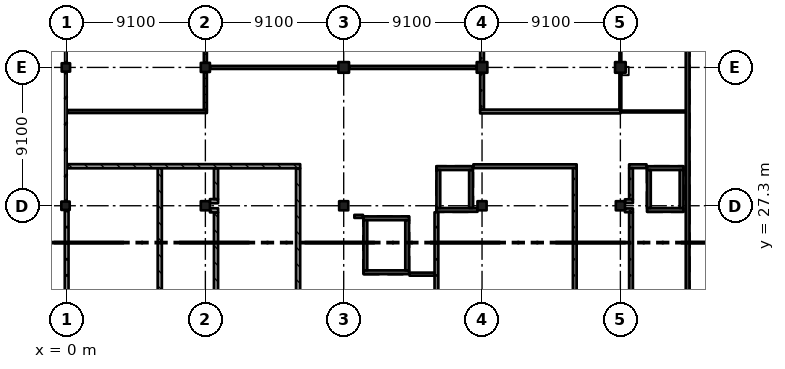
"""IFC4 building model, lengths in metres.
Left out: names, types, materials, properties, quantities, classifications, styles, units other than length and angle.
Written with IfcOpenShell. Run it as: python <this file> out.ifc"""

import sys

from ifc_helpers import new_model, si_unit, direction, frame, frame_2d, origin, origin_2d, place, context, subcontext, project, spatial, rectangle, extrude, element, fill, save


model = new_model("IFC4")
c1 = context("Model", 3, precision=1e-05, world=origin(), true_north=direction((0.0, 1.0)))
c2 = subcontext(c1, "Body", "Model", "MODEL_VIEW")
j1 = project(units=[si_unit("LENGTHUNIT", "METRE"), si_unit("PLANEANGLEUNIT", "RADIAN")], contexts=[c1])
p1 = place(None, origin())
s1 = spatial("IfcSite", under=j1, at=p1, CompositionType="ELEMENT")
p2 = place(p1, origin())
s2 = spatial("IfcBuilding", under=s1, at=p2, CompositionType="ELEMENT")
p3 = place(p2, frame((0.0, 0.0, 20.02)))
s3 = spatial("IfcBuildingStorey", under=s2, at=p3, CompositionType="ELEMENT", Elevation=20.02)
for number, where, z_axis, x_axis in (
    (1, (-0.1, 27.3, 0.0), (0.0, 0.0, 1.0), (1.0, 0.0, 0.0)),
    (2, (-0.075, 36.4, 0.0), (0.0, 0.0, 1.0), (1.0, 0.0, 0.0)),
):
    element("IfcColumn", number, at=place(p3, frame(where, z_axis=z_axis, x_axis=x_axis)), inside=s3, PredefinedType="COLUMN", context=c2, shape_type="SweptSolid", body=[
        extrude(rectangle(XDim=0.55, YDim=0.55, at=origin_2d()), origin(), (0.0, 0.0, 1.0), 4.55),
    ])
for number, where, z_axis, x_axis in (
    (3, (9.1, 27.3, 0.0), (0.0, 0.0, 1.0), (1.0, 0.0, 0.0)),
    (4, (9.1, 36.4, 0.0), (0.0, 0.0, 1.0), (1.0, 0.0, 0.0)),
    (5, (18.2, 27.3, 0.0), (0.0, 0.0, 1.0), (1.0, 0.0, 0.0)),
):
    element("IfcColumn", number, at=place(p3, frame(where, z_axis=z_axis, x_axis=x_axis)), inside=s3, PredefinedType="COLUMN", context=c2, shape_type="SweptSolid", body=[
        extrude(rectangle(XDim=0.6, YDim=0.6, at=origin_2d()), origin(), (0.0, 0.0, 1.0), 4.55),
    ])
p4 = place(p3, frame((18.2, 36.4, 0.0), z_axis=(0.0, 0.0, 1.0), x_axis=(1.0, 0.0, 0.0)))
e6 = element("IfcColumn", 6, at=p4, inside=s3, PredefinedType="COLUMN", context=c2, shape_type="SweptSolid", body=[
    extrude(rectangle(XDim=0.7, YDim=0.7, at=origin_2d()), origin(), (0.0, 0.0, 1.0), 4.55),
])
p5 = place(p3, frame((27.3, 27.3, 0.0), z_axis=(0.0, 0.0, 1.0), x_axis=(1.0, 0.0, 0.0)))
e7 = element("IfcColumn", 7, at=p5, inside=s3, PredefinedType="COLUMN", context=c2, shape_type="SweptSolid", body=[
    extrude(rectangle(XDim=0.6, YDim=0.6, at=origin_2d()), origin(), (0.0, 0.0, 1.0), 4.55),
])
p6 = place(p3, frame((27.3, 36.4, 0.0), z_axis=(0.0, 0.0, 1.0), x_axis=(1.0, 0.0, 0.0)))
e8 = element("IfcColumn", 8, at=p6, inside=s3, PredefinedType="COLUMN", context=c2, shape_type="SweptSolid", body=[
    extrude(rectangle(XDim=0.7, YDim=0.7, at=origin_2d()), origin(), (0.0, 0.0, 1.0), 4.55),
])
p7 = place(p3, frame((36.4, 27.3, 0.0), z_axis=(0.0, 0.0, 1.0), x_axis=(1.0, 0.0, 0.0)))
e9 = element("IfcColumn", 9, at=p7, inside=s3, PredefinedType="COLUMN", context=c2, shape_type="SweptSolid", body=[
    extrude(rectangle(XDim=0.6, YDim=0.6, at=origin_2d()), origin(), (0.0, 0.0, 1.0), 4.55),
])
p8 = place(p3, frame((36.4, 36.4, 0.0), z_axis=(0.0, 0.0, 1.0), x_axis=(1.0, 0.0, 0.0)))
e10 = element("IfcColumn", 10, at=p8, inside=s3, PredefinedType="COLUMN", context=c2, shape_type="SweptSolid", body=[
    extrude(rectangle(XDim=0.7, YDim=0.7, at=origin_2d()), origin(), (0.0, 0.0, 1.0), 4.55),
])
p9 = place(p3, frame((40.825, 40.95, 0.0), z_axis=(0.0, 0.0, 1.0), x_axis=(0.0, -1.0, 0.0)))
e11 = element("IfcWall", 11, at=p9, inside=s3, PredefinedType="SHEAR", context=c2, shape_type="SweptSolid", body=[
    extrude(rectangle(XDim=31.85, YDim=0.25, at=frame_2d((15.925, 0.0))), origin(), (0.0, 0.0, 1.0), 4.55),
])
p10 = place(p3, frame((40.55, 27.025, 0.0), z_axis=(0.0, 0.0, 1.0), x_axis=(-1.0, 0.0, 0.0)))
e12 = element("IfcWall", 12, at=p10, inside=s3, PredefinedType="SHEAR", context=c2, shape_type="SweptSolid", body=[
    extrude(rectangle(XDim=2.4, YDim=0.25, at=frame_2d((1.2, 0.0))), origin(), (0.0, 0.0, 1.0), 4.55),
])
p11 = place(p10, frame((0.75, 0.0, 0.0)))
e13 = element("IfcOpeningElement", 13, at=p11, cuts=e12, PredefinedType="OPENING", context=c2, shape_type="SweptSolid", body=[
    extrude(rectangle(XDim=0.9, YDim=2.1, at=frame_2d((0.45, 1.05))), frame((0.0, 0.135, 0.0), z_axis=(0.0, -1.0, 0.0), x_axis=(1.0, 0.0, 0.0)), (0.0, 0.0, 1.0), 0.27),
])
p12 = place(p3, frame((40.55, 29.775, 0.0), z_axis=(0.0, 0.0, 1.0), x_axis=(-1.0, 0.0, 0.0)))
e14 = element("IfcWall", 14, at=p12, inside=s3, PredefinedType="SHEAR", context=c2, shape_type="SweptSolid", body=[
    extrude(rectangle(XDim=2.4, YDim=0.25, at=frame_2d((1.2, 0.0))), origin(), (0.0, 0.0, 1.0), 4.55),
])
for number, where, z_axis, x_axis in (
    (15, (38.275, 29.65, 0.0), (0.0, 0.0, 1.0), (0.0, -1.0, 0.0)),
    (16, (40.425, 29.65, 0.0), (0.0, 0.0, 1.0), (0.0, -1.0, 0.0)),
):
    element("IfcWall", number, at=place(p3, frame(where, z_axis=z_axis, x_axis=x_axis)), inside=s3, PredefinedType="SHEAR", context=c2, shape_type="SweptSolid", body=[
        extrude(rectangle(XDim=2.5, YDim=0.25, at=frame_2d((1.25, 0.0))), origin(), (0.0, 0.0, 1.0), 4.55),
    ])
p13 = place(p3, frame((27.0, 27.025, 0.0), z_axis=(0.0, 0.0, 1.0), x_axis=(-1.0, 0.0, 0.0)))
e17 = element("IfcWall", 17, at=p13, inside=s3, PredefinedType="SHEAR", context=c2, shape_type="SweptSolid", body=[
    extrude(rectangle(XDim=2.7, YDim=0.25, at=frame_2d((1.35, 0.0))), origin(), (0.0, 0.0, 1.0), 4.55),
])
p14 = place(p3, frame((26.7, 29.775, 0.0), z_axis=(0.0, 0.0, 1.0), x_axis=(-1.0, 0.0, 0.0)))
e18 = element("IfcWall", 18, at=p14, inside=s3, PredefinedType="SHEAR", context=c2, shape_type="SweptSolid", body=[
    extrude(rectangle(XDim=2.4, YDim=0.25, at=frame_2d((1.2, 0.0))), origin(), (0.0, 0.0, 1.0), 4.55),
])
p15 = place(p3, frame((24.425, 29.65, 0.0), z_axis=(0.0, 0.0, 1.0), x_axis=(0.0, -1.0, 0.0)))
e19 = element("IfcWall", 19, at=p15, inside=s3, PredefinedType="SHEAR", context=c2, shape_type="SweptSolid", body=[
    extrude(rectangle(XDim=2.5, YDim=0.25, at=frame_2d((1.25, 0.0))), origin(), (0.0, 0.0, 1.0), 4.55),
])
p16 = place(p15, frame((0.9, 0.0, 0.0)))
e20 = element("IfcOpeningElement", 20, at=p16, cuts=e19, PredefinedType="OPENING", context=c2, shape_type="SweptSolid", body=[
    extrude(rectangle(XDim=0.7, YDim=2.1, at=frame_2d((0.35, 1.05))), frame((0.0, 0.135, 0.0), z_axis=(0.0, -1.0, 0.0), x_axis=(1.0, 0.0, 0.0)), (0.0, 0.0, 1.0), 0.27),
])
p17 = place(p3, frame((26.575, 29.65, 0.0), z_axis=(0.0, 0.0, 1.0), x_axis=(0.0, -1.0, 0.0)))
e21 = element("IfcWall", 21, at=p17, inside=s3, PredefinedType="SHEAR", context=c2, shape_type="SweptSolid", body=[
    extrude(rectangle(XDim=2.5, YDim=0.25, at=frame_2d((1.25, 0.0))), origin(), (0.0, 0.0, 1.0), 4.55),
])
p18 = place(p3, frame((22.5, 22.925, 0.0), z_axis=(0.0, 0.0, 1.0), x_axis=(-1.0, 0.0, 0.0)))
e22 = element("IfcWall", 22, at=p18, inside=s3, PredefinedType="SHEAR", context=c2, shape_type="SweptSolid", body=[
    extrude(rectangle(XDim=3.0, YDim=0.25, at=frame_2d((1.5, 0.0))), origin(), (0.0, 0.0, 1.0), 4.55),
])
p19 = place(p18, frame((0.95, 0.0, 0.0)))
e23 = element("IfcOpeningElement", 23, at=p19, cuts=e22, PredefinedType="OPENING", context=c2, shape_type="SweptSolid", body=[
    extrude(rectangle(XDim=1.1, YDim=2.1, at=frame_2d((0.55, 1.05))), frame((0.0, 0.135, 0.0), z_axis=(0.0, -1.0, 0.0), x_axis=(1.0, 0.0, 0.0)), (0.0, 0.0, 1.0), 0.27),
])
p20 = place(p3, frame((22.5, 26.475, 0.0), z_axis=(0.0, 0.0, 1.0), x_axis=(-1.0, 0.0, 0.0)))
e24 = element("IfcWall", 24, at=p20, inside=s3, PredefinedType="SHEAR", context=c2, shape_type="SweptSolid", body=[
    extrude(rectangle(XDim=3.0, YDim=0.25, at=frame_2d((1.5, 0.0))), origin(), (0.0, 0.0, 1.0), 4.55),
])
for number, where, z_axis, x_axis in (
    (25, (19.625, 26.35, 0.0), (0.0, 0.0, 1.0), (0.0, -1.0, 0.0)),
    (26, (22.375, 26.35, 0.0), (0.0, 0.0, 1.0), (0.0, -1.0, 0.0)),
):
    element("IfcWall", number, at=place(p3, frame(where, z_axis=z_axis, x_axis=x_axis)), inside=s3, PredefinedType="SHEAR", context=c2, shape_type="SweptSolid", body=[
        extrude(rectangle(XDim=3.3, YDim=0.25, at=frame_2d((1.65, 0.0))), origin(), (0.0, 0.0, 1.0), 4.55),
    ])
p21 = place(p3, frame((-0.025, 27.025, 0.0), z_axis=(0.0, 0.0, 1.0), x_axis=(0.0, -1.0, 0.0)))
e27 = element("IfcWall", 27, at=p21, inside=s3, PredefinedType="SOLIDWALL", context=c2, shape_type="SweptSolid", body=[
    extrude(rectangle(XDim=8.55, YDim=0.25, at=frame_2d((4.275, 0.0))), origin(), (0.0, 0.0, 1.0), 3.5),
])
p22 = place(p3, frame((0.03, 29.9, 0.0), z_axis=(0.0, 0.0, 1.0), x_axis=(1.0, 0.0, 0.0)))
e28 = element("IfcWall", 28, at=p22, inside=s3, PredefinedType="SOLIDWALL", context=c2, shape_type="SweptSolid", body=[
    extrude(rectangle(XDim=15.307, YDim=0.275, at=frame_2d((7.654, 0.0))), origin(), (0.0, 0.0, 1.0), 4.25),
])
p23 = place(p3, frame((0.03, 33.5, 0.0), z_axis=(0.0, 0.0, 1.0), x_axis=(1.0, 0.0, 0.0)))
e29 = element("IfcWall", 29, at=p23, inside=s3, PredefinedType="PARTITIONING", context=c2, shape_type="SweptSolid", body=[
    extrude(rectangle(XDim=9.17, YDim=0.2, at=frame_2d((4.585, 0.0))), origin(), (0.0, 0.0, 1.0), 4.25),
])
p24 = place(p23, frame((1.05, 0.0, 0.0)))
e30 = element("IfcOpeningElement", 30, at=p24, cuts=e29, PredefinedType="OPENING", context=c2, shape_type="SweptSolid", body=[
    extrude(rectangle(XDim=2.4, YDim=2.4, at=frame_2d((1.2, 1.2))), frame((0.0, 0.11, 0.0), z_axis=(0.0, -1.0, 0.0), x_axis=(1.0, 0.0, 0.0)), (0.0, 0.0, 1.0), 0.22),
])
p25 = place(p23, frame((5.65, 0.0, 0.0)))
e31 = element("IfcOpeningElement", 31, at=p25, cuts=e29, PredefinedType="OPENING", context=c2, shape_type="SweptSolid", body=[
    extrude(rectangle(XDim=2.4, YDim=2.4, at=frame_2d((1.2, 1.2))), frame((0.0, 0.11, 0.0), z_axis=(0.0, -1.0, 0.0), x_axis=(1.0, 0.0, 0.0)), (0.0, 0.0, 1.0), 0.22),
])
p26 = place(p3, frame((6.1, 29.762, 0.0), z_axis=(0.0, 0.0, 1.0), x_axis=(0.0, -1.0, 0.0)))
e32 = element("IfcWall", 32, at=p26, inside=s3, PredefinedType="SOLIDWALL", context=c2, shape_type="SweptSolid", body=[
    extrude(rectangle(XDim=9.825, YDim=0.275, at=frame_2d((4.913, 0.0))), origin(), (0.0, 0.0, 1.0), 4.25),
])
p27 = place(p3, frame((9.1, 33.6, 0.0), z_axis=(0.0, 0.0, 1.0), x_axis=(0.0, 1.0, 0.0)))
e33 = element("IfcWall", 33, at=p27, inside=s3, PredefinedType="PARTITIONING", context=c2, shape_type="SweptSolid", body=[
    extrude(rectangle(XDim=2.5, YDim=0.2, at=frame_2d((1.25, 0.0))), origin(), (0.0, 0.0, 1.0), 3.5),
])
p28 = place(p3, frame((9.1, 36.7, 0.0), z_axis=(0.0, 0.0, 1.0), x_axis=(0.0, 1.0, 0.0)))
e34 = element("IfcWall", 34, at=p28, inside=s3, PredefinedType="PARTITIONING", context=c2, shape_type="SweptSolid", body=[
    extrude(rectangle(XDim=4.0, YDim=0.2, at=frame_2d((2.0, 0.0))), origin(), (0.0, 0.0, 1.0), 3.25),
])
p29 = place(p3, frame((9.4, 27.6, 0.0), z_axis=(0.0, 0.0, 1.0), x_axis=(1.0, 0.0, 0.0)))
e35 = element("IfcWall", 35, at=p29, inside=s3, PredefinedType="SOLIDWALL", context=c2, shape_type="SweptSolid", body=[
    extrude(rectangle(XDim=0.538, YDim=0.275, at=frame_2d((0.269, 0.0))), origin(), (0.0, 0.0, 1.0), 4.25),
])
p30 = place(p3, frame((9.8, 19.938, 0.0), z_axis=(0.0, 0.0, 1.0), x_axis=(0.0, 1.0, 0.0)))
e36 = element("IfcWall", 36, at=p30, inside=s3, PredefinedType="SOLIDWALL", context=c2, shape_type="SweptSolid", body=[
    extrude(rectangle(XDim=6.925, YDim=0.275, at=frame_2d((3.462, 0.0))), origin(), (0.0, 0.0, 1.0), 4.25),
])
p31 = place(p3, frame((9.8, 27.738, 0.0), z_axis=(0.0, 0.0, 1.0), x_axis=(0.0, 1.0, 0.0)))
e37 = element("IfcWall", 37, at=p31, inside=s3, PredefinedType="SOLIDWALL", context=c2, shape_type="SweptSolid", body=[
    extrude(rectangle(XDim=2.025, YDim=0.275, at=frame_2d((1.012, 0.0))), origin(), (0.0, 0.0, 1.0), 4.25),
])
p32 = place(p3, frame((9.938, 27.0, 0.0), z_axis=(0.0, 0.0, 1.0), x_axis=(-1.0, 0.0, 0.0)))
e38 = element("IfcWall", 38, at=p32, inside=s3, PredefinedType="SOLIDWALL", context=c2, shape_type="SweptSolid", body=[
    extrude(rectangle(XDim=0.538, YDim=0.275, at=frame_2d((0.269, 0.0))), origin(), (0.0, 0.0, 1.0), 4.25),
])
p33 = place(p3, frame((15.2, 29.762, 0.0), z_axis=(0.0, 0.0, 1.0), x_axis=(0.0, -1.0, 0.0)))
e39 = element("IfcWall", 39, at=p33, inside=s3, PredefinedType="SOLIDWALL", context=c2, shape_type="SweptSolid", body=[
    extrude(rectangle(XDim=9.825, YDim=0.275, at=frame_2d((4.913, 0.0))), origin(), (0.0, 0.0, 1.0), 4.25),
])
p34 = place(p3, frame((17.85, 36.4, 0.0), z_axis=(0.0, 0.0, 1.0), x_axis=(-1.0, 0.0, 0.0)))
e40 = element("IfcWall", 40, at=p34, inside=s3, PredefinedType="PARTITIONING", context=c2, shape_type="SweptSolid", body=[
    extrude(rectangle(XDim=8.45, YDim=0.2, at=frame_2d((4.225, 0.0))), origin(), (0.0, 0.0, 1.0), 3.5),
])
p35 = place(p34, frame((3.75, 0.0, 0.0)))
e41 = element("IfcOpeningElement", 41, at=p35, cuts=e40, PredefinedType="OPENING", context=c2, shape_type="SweptSolid", body=[
    extrude(rectangle(XDim=1.0, YDim=2.1, at=frame_2d((0.5, 1.05))), frame((0.0, 0.11, 0.0), z_axis=(0.0, -1.0, 0.0), x_axis=(1.0, 0.0, 0.0)), (0.0, 0.0, 1.0), 0.22),
])
p36 = place(p3, frame((18.9, 26.6, 0.0), z_axis=(0.0, 0.0, 1.0), x_axis=(1.0, 0.0, 0.0)))
e42 = element("IfcWall", 42, at=p36, inside=s3, PredefinedType="PARTITIONING", context=c2, shape_type="SweptSolid", body=[
    extrude(rectangle(XDim=0.57, YDim=0.2, at=frame_2d((0.285, 0.0))), origin(), (0.0, 0.0, 1.0), 4.25),
])
p37 = place(p3, frame((22.53, 22.8, 0.0), z_axis=(0.0, 0.0, 1.0), x_axis=(1.0, 0.0, 0.0)))
e43 = element("IfcWall", 43, at=p37, inside=s3, PredefinedType="PARTITIONING", context=c2, shape_type="SweptSolid", body=[
    extrude(rectangle(XDim=1.645, YDim=0.2, at=frame_2d((0.823, 0.0))), origin(), (0.0, 0.0, 1.0), 4.25),
])
p38 = place(p3, frame((24.3, 19.925, 0.0), z_axis=(0.0, 0.0, 1.0), x_axis=(0.0, 1.0, 0.0)))
e44 = element("IfcWall", 44, at=p38, inside=s3, PredefinedType="SOLIDWALL", context=c2, shape_type="SweptSolid", body=[
    extrude(rectangle(XDim=6.945, YDim=0.25, at=frame_2d((3.473, 0.0))), origin(), (0.0, 0.0, 1.0), 4.25),
])
p39 = place(p3, frame((26.73, 29.9, 0.0), z_axis=(0.0, 0.0, 1.0), x_axis=(1.0, 0.0, 0.0)))
e45 = element("IfcWall", 45, at=p39, inside=s3, PredefinedType="SOLIDWALL", context=c2, shape_type="SweptSolid", body=[
    extrude(rectangle(XDim=6.795, YDim=0.25, at=frame_2d((3.397, 0.0))), origin(), (0.0, 0.0, 1.0), 4.25),
])
p40 = place(p3, frame((26.95, 36.4, 0.0), z_axis=(0.0, 0.0, 1.0), x_axis=(-1.0, 0.0, 0.0)))
e46 = element("IfcWall", 46, at=p40, inside=s3, PredefinedType="PARTITIONING", context=c2, shape_type="SweptSolid", body=[
    extrude(rectangle(XDim=8.4, YDim=0.2, at=frame_2d((4.2, 0.0))), origin(), (0.0, 0.0, 1.0), 3.55),
])
p41 = place(p3, frame((27.3, 33.625, 0.0), z_axis=(0.0, 0.0, 1.0), x_axis=(0.0, 1.0, 0.0)))
e47 = element("IfcWall", 47, at=p41, inside=s3, PredefinedType="SOLIDWALL", context=c2, shape_type="SweptSolid", body=[
    extrude(rectangle(XDim=2.425, YDim=0.25, at=frame_2d((1.212, 0.0))), origin(), (0.0, 0.0, 1.0), 3.5),
])
p42 = place(p3, frame((27.3, 40.7, 0.0), z_axis=(0.0, 0.0, 1.0), x_axis=(0.0, -1.0, 0.0)))
e48 = element("IfcWall", 48, at=p42, inside=s3, PredefinedType="SOLIDWALL", context=c2, shape_type="SweptSolid", body=[
    extrude(rectangle(XDim=3.95, YDim=0.25, at=frame_2d((1.975, 0.0))), origin(), (0.0, 0.0, 1.0), 4.25),
])
p43 = place(p3, frame((33.4, 29.775, 0.0), z_axis=(0.0, 0.0, 1.0), x_axis=(0.0, -1.0, 0.0)))
e49 = element("IfcWall", 49, at=p43, inside=s3, PredefinedType="SOLIDWALL", context=c2, shape_type="SweptSolid", body=[
    extrude(rectangle(XDim=9.85, YDim=0.25, at=frame_2d((4.925, 0.0))), origin(), (0.0, 0.0, 1.0), 4.25),
])
p44 = place(p3, frame((36.4, 33.5, 0.0), z_axis=(0.0, 0.0, 1.0), x_axis=(-1.0, 0.0, 0.0)))
e50 = element("IfcWall", 50, at=p44, inside=s3, PredefinedType="SOLIDWALL", context=c2, shape_type="SweptSolid", body=[
    extrude(rectangle(XDim=9.225, YDim=0.25, at=frame_2d((4.612, 0.0))), origin(), (0.0, 0.0, 1.0), 4.25),
])
p45 = place(p44, frame((4.15, 0.0, 0.0)))
e51 = element("IfcOpeningElement", 51, at=p45, cuts=e50, PredefinedType="OPENING", context=c2, shape_type="SweptSolid", body=[
    extrude(rectangle(XDim=1.0, YDim=2.1, at=frame_2d((0.5, 1.05))), frame((0.0, 0.135, 0.0), z_axis=(0.0, -1.0, 0.0), x_axis=(1.0, 0.0, 0.0)), (0.0, 0.0, 1.0), 0.27),
])
p46 = place(p3, frame((36.4, 36.05, 0.0), z_axis=(0.0, 0.0, 1.0), x_axis=(0.0, -1.0, 0.0)))
e52 = element("IfcWall", 52, at=p46, inside=s3, PredefinedType="PARTITIONING", context=c2, shape_type="SweptSolid", body=[
    extrude(rectangle(XDim=2.425, YDim=0.125, at=frame_2d((1.212, 0.0))), origin(), (0.0, 0.0, 1.0), 3.5),
])
p47 = place(p3, frame((36.4, 40.7, 0.0), z_axis=(0.0, 0.0, 1.0), x_axis=(0.0, -1.0, 0.0)))
e53 = element("IfcWall", 53, at=p47, inside=s3, PredefinedType="PARTITIONING", context=c2, shape_type="SweptSolid", body=[
    extrude(rectangle(XDim=3.95, YDim=0.125, at=frame_2d((1.975, 0.0))), origin(), (0.0, 0.0, 1.0), 4.25),
])
p48 = place(p3, frame((36.7, 27.0, 0.0), z_axis=(0.0, 0.0, 1.0), x_axis=(1.0, 0.0, 0.0)))
e54 = element("IfcWall", 54, at=p48, inside=s3, PredefinedType="SOLIDWALL", context=c2, shape_type="SweptSolid", body=[
    extrude(rectangle(XDim=0.525, YDim=0.25, at=frame_2d((0.263, 0.0))), origin(), (0.0, 0.0, 1.0), 4.25),
])
p49 = place(p3, frame((36.975, 29.9, 0.0), z_axis=(0.0, 0.0, 1.0), x_axis=(1.0, 0.0, 0.0)))
e55 = element("IfcWall", 55, at=p49, inside=s3, PredefinedType="SOLIDWALL", context=c2, shape_type="SweptSolid", body=[
    extrude(rectangle(XDim=1.145, YDim=0.25, at=frame_2d((0.573, 0.0))), origin(), (0.0, 0.0, 1.0), 4.25),
])
p50 = place(p3, frame((37.1, 26.875, 0.0), z_axis=(0.0, 0.0, 1.0), x_axis=(0.0, -1.0, 0.0)))
e56 = element("IfcWall", 56, at=p50, inside=s3, PredefinedType="SOLIDWALL", context=c2, shape_type="SweptSolid", body=[
    extrude(rectangle(XDim=6.95, YDim=0.25, at=frame_2d((3.475, 0.0))), origin(), (0.0, 0.0, 1.0), 4.25),
])
p51 = place(p3, frame((37.1, 29.775, 0.0), z_axis=(0.0, 0.0, 1.0), x_axis=(0.0, -1.0, 0.0)))
e57 = element("IfcWall", 57, at=p51, inside=s3, PredefinedType="SOLIDWALL", context=c2, shape_type="SweptSolid", body=[
    extrude(rectangle(XDim=2.05, YDim=0.25, at=frame_2d((1.025, 0.0))), origin(), (0.0, 0.0, 1.0), 4.25),
])
p52 = place(p3, frame((37.225, 27.6, 0.0), z_axis=(0.0, 0.0, 1.0), x_axis=(-1.0, 0.0, 0.0)))
e58 = element("IfcWall", 58, at=p52, inside=s3, PredefinedType="SOLIDWALL", context=c2, shape_type="SweptSolid", body=[
    extrude(rectangle(XDim=0.525, YDim=0.25, at=frame_2d((0.263, 0.0))), origin(), (0.0, 0.0, 1.0), 4.25),
])
p53 = place(p3, frame((40.7, 33.5, 0.0), z_axis=(0.0, 0.0, 1.0), x_axis=(-1.0, 0.0, 0.0)))
e59 = element("IfcWall", 59, at=p53, inside=s3, PredefinedType="PARTITIONING", context=c2, shape_type="SweptSolid", body=[
    extrude(rectangle(XDim=4.3, YDim=0.125, at=frame_2d((2.15, 0.0))), origin(), (0.0, 0.0, 1.0), 4.25),
])
p54 = place(p53, frame((1.75, 0.0, 0.0)))
e60 = element("IfcOpeningElement", 60, at=p54, cuts=e59, PredefinedType="OPENING", context=c2, shape_type="SweptSolid", body=[
    extrude(rectangle(XDim=0.9, YDim=2.1, at=frame_2d((0.45, 1.05))), frame((0.0, 0.073, 0.0), z_axis=(0.0, -1.0, 0.0), x_axis=(1.0, 0.0, 0.0)), (0.0, 0.0, 1.0), 0.145),
])
p55 = place(p35, origin())
e61 = element("IfcDoor", 61, at=p55, inside=s3, OperationType="SINGLE_SWING_RIGHT", PredefinedType="DOOR", context=c2, shape_type="SweptSolid", body=[
    extrude(rectangle(XDim=1.0, YDim=2.1, at=frame_2d((0.5, 1.05))), frame((0.0, 0.025, 0.0), z_axis=(0.0, -1.0, 0.0), x_axis=(1.0, 0.0, 0.0)), (0.0, 0.0, 1.0), 0.05),
])
fill(e41, e61)
p56 = place(p45, origin())
e62 = element("IfcDoor", 62, at=p56, inside=s3, OperationType="SINGLE_SWING_RIGHT", PredefinedType="DOOR", context=c2, shape_type="SweptSolid", body=[
    extrude(rectangle(XDim=1.0, YDim=2.1, at=frame_2d((0.5, 1.05))), frame((0.0, 0.025, 0.0), z_axis=(0.0, -1.0, 0.0), x_axis=(1.0, 0.0, 0.0)), (0.0, 0.0, 1.0), 0.05),
])
fill(e51, e62)
p57 = place(p54, origin())
e63 = element("IfcDoor", 63, at=p57, inside=s3, OperationType="SINGLE_SWING_RIGHT", PredefinedType="DOOR", context=c2, shape_type="SweptSolid", body=[
    extrude(rectangle(XDim=0.9, YDim=2.1, at=frame_2d((0.45, 1.05))), frame((0.0, 0.025, 0.0), z_axis=(0.0, -1.0, 0.0), x_axis=(1.0, 0.0, 0.0)), (0.0, 0.0, 1.0), 0.05),
])
fill(e60, e63)
p58 = place(p24, origin())
e64 = element("IfcDoor", 64, at=p58, inside=s3, OperationType="DOUBLE_DOOR_SINGLE_SWING", PredefinedType="DOOR", context=c2, shape_type="SweptSolid", body=[
    extrude(rectangle(XDim=2.4, YDim=2.4, at=frame_2d((1.2, 1.2))), frame((0.0, 0.025, 0.0), z_axis=(0.0, -1.0, 0.0), x_axis=(1.0, 0.0, 0.0)), (0.0, 0.0, 1.0), 0.05),
])
fill(e30, e64)
p59 = place(p25, origin())
e65 = element("IfcDoor", 65, at=p59, inside=s3, OperationType="DOUBLE_DOOR_SINGLE_SWING", PredefinedType="DOOR", context=c2, shape_type="SweptSolid", body=[
    extrude(rectangle(XDim=2.4, YDim=2.4, at=frame_2d((1.2, 1.2))), frame((0.0, 0.025, 0.0), z_axis=(0.0, -1.0, 0.0), x_axis=(1.0, 0.0, 0.0)), (0.0, 0.0, 1.0), 0.05),
])
fill(e31, e65)
p60 = place(p11, origin())
e66 = element("IfcDoor", 66, at=p60, inside=s3, OperationType="SINGLE_SWING_RIGHT", PredefinedType="DOOR", context=c2, shape_type="SweptSolid", body=[
    extrude(rectangle(XDim=0.9, YDim=2.1, at=frame_2d((0.45, 1.05))), frame((0.0, 0.025, 0.0), z_axis=(0.0, -1.0, 0.0), x_axis=(1.0, 0.0, 0.0)), (0.0, 0.0, 1.0), 0.05),
])
fill(e13, e66)
p61 = place(p16, origin())
e67 = element("IfcDoor", 67, at=p61, inside=s3, OperationType="SINGLE_SWING_LEFT", PredefinedType="DOOR", context=c2, shape_type="SweptSolid", body=[
    extrude(rectangle(XDim=0.7, YDim=2.1, at=frame_2d((0.35, 1.05))), frame((0.0, 0.025, 0.0), z_axis=(0.0, -1.0, 0.0), x_axis=(1.0, 0.0, 0.0)), (0.0, 0.0, 1.0), 0.05),
])
fill(e20, e67)
p62 = place(p19, origin())
e68 = element("IfcDoor", 68, at=p62, inside=s3, OperationType="DOUBLE_DOOR_SLIDING", PredefinedType="DOOR", context=c2, shape_type="SweptSolid", body=[
    extrude(rectangle(XDim=1.1, YDim=2.1, at=frame_2d((0.55, 1.05))), frame((0.0, 0.025, 0.0), z_axis=(0.0, -1.0, 0.0), x_axis=(1.0, 0.0, 0.0)), (0.0, 0.0, 1.0), 0.05),
])
fill(e23, e68)
save(model, sys.argv[1])
